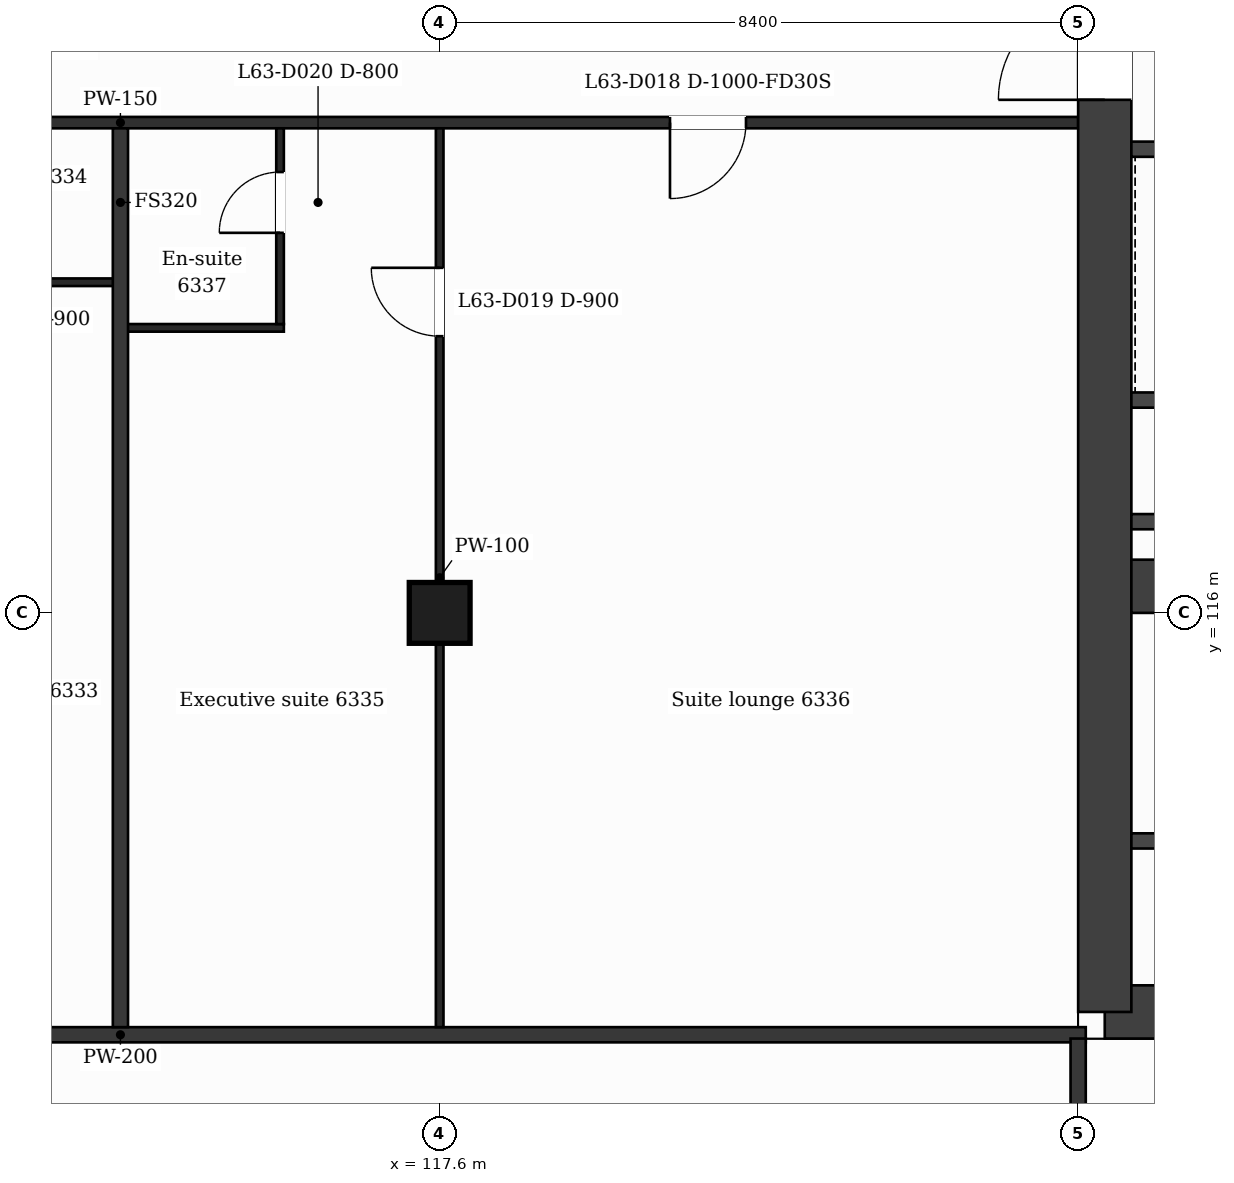
"""IFC4 building model, lengths in metres.
Left out: names, types, materials, properties, quantities, classifications, styles, units other than length and angle.
Written with IfcOpenShell. Run it as: python <this file> out.ifc"""

import sys

from ifc_helpers import new_model, si_unit, direction, frame, frame_2d, origin, origin_2d, place, context, subcontext, project, spatial, rectangle, extrude, element, fill, save


model = new_model("IFC4")
c1 = context("Model", 3, precision=1e-05, world=origin(), true_north=direction((0.0, 1.0)))
c2 = subcontext(c1, "Body", "Model", "MODEL_VIEW")
j1 = project(units=[si_unit("LENGTHUNIT", "METRE"), si_unit("PLANEANGLEUNIT", "RADIAN")], contexts=[c1])
p1 = place(None, origin())
s1 = spatial("IfcSite", under=j1, at=p1, CompositionType="ELEMENT")
p2 = place(p1, origin())
s2 = spatial("IfcBuilding", under=s1, at=p2, CompositionType="ELEMENT")
p3 = place(p2, frame((0.0, 0.0, 262.7)))
s3 = spatial("IfcBuildingStorey", under=s2, at=p3, CompositionType="ELEMENT", Elevation=262.7)
p4 = place(p3, frame((140.73, 110.75, 0.0), z_axis=(0.0, 0.0, 1.0), x_axis=(-1.0, 0.0, 0.0)))
e1 = element("IfcWall", 1, at=p4, inside=s3, PredefinedType="SHEAR", context=c2, shape_type="SweptSolid", body=[
    extrude(rectangle(XDim=14.38, YDim=0.7, at=frame_2d((7.19, 0.0))), origin(), (0.0, 0.0, 1.0), 3.7),
])
p5 = place(p4, frame((7.12, 0.0, 0.0)))
e2 = element("IfcOpeningElement", 2, at=p5, cuts=e1, PredefinedType="OPENING", context=c2, shape_type="SweptSolid", body=[
    extrude(rectangle(XDim=1.2, YDim=2.1, at=frame_2d((0.6, 1.05))), frame((0.0, 0.36, 0.0), z_axis=(0.0, -1.0, 0.0), x_axis=(1.0, 0.0, 0.0)), (0.0, 0.0, 1.0), 0.72),
])
p6 = place(p3, frame((126.35, 110.75, 0.0), z_axis=(0.0, 0.0, 1.0), x_axis=(0.0, 1.0, 0.0)))
e3 = element("IfcWall", 3, at=p6, inside=s3, PredefinedType="SHEAR", context=c2, shape_type="SweptSolid", body=[
    extrude(rectangle(XDim=21.3, YDim=0.7, at=frame_2d((10.65, 0.0))), origin(), (0.0, 0.0, 1.0), 3.7),
])
p7 = place(p6, frame((12.0, 0.0, 0.0)))
e4 = element("IfcOpeningElement", 4, at=p7, cuts=e3, PredefinedType="OPENING", context=c2, shape_type="SweptSolid", body=[
    extrude(rectangle(XDim=1.4, YDim=2.1, at=frame_2d((0.7, 1.05))), frame((0.0, 0.36, 0.0), z_axis=(0.0, -1.0, 0.0), x_axis=(1.0, 0.0, 0.0)), (0.0, 0.0, 1.0), 0.72),
])
p8 = place(p3, frame((126.7, 116.35, 0.0), z_axis=(0.0, 0.0, 1.0), x_axis=(1.0, 0.0, 0.0)))
e5 = element("IfcWall", 5, at=p8, inside=s3, PredefinedType="SHEAR", context=c2, shape_type="SweptSolid", body=[
    extrude(rectangle(XDim=5.5, YDim=0.7, at=frame_2d((2.75, 0.0))), origin(), (0.0, 0.0, 1.0), 3.7),
])
p9 = place(p3, frame((117.6, 116.0, 0.0), z_axis=(0.0, 0.0, 1.0), x_axis=(1.0, 0.0, 0.0)))
e6 = element("IfcColumn", 6, at=p9, inside=s3, PredefinedType="COLUMN", context=c2, shape_type="SweptSolid", body=[
    extrude(rectangle(XDim=0.8, YDim=0.8, at=origin_2d()), origin(), (0.0, 0.0, 1.0), 3.7),
])
p10 = place(p3, frame((100.7, 110.45, 0.0), z_axis=(0.0, 0.0, 1.0), x_axis=(1.0, 0.0, 0.0)))
e7 = element("IfcWall", 7, at=p10, inside=s3, PredefinedType="PARTITIONING", context=c2, shape_type="SweptSolid", body=[
    extrude(rectangle(XDim=25.4, YDim=0.2, at=frame_2d((12.7, 0.0))), origin(), (0.0, 0.0, 1.0), 3.38),
])
p11 = place(p3, frame((126.7, 113.0, 0.0), z_axis=(0.0, 0.0, 1.0), x_axis=(1.0, 0.0, 0.0)))
e8 = element("IfcWall", 8, at=p11, inside=s3, PredefinedType="PARTITIONING", context=c2, shape_type="SweptSolid", body=[
    extrude(rectangle(XDim=4.973, YDim=0.2, at=frame_2d((2.487, 0.0))), origin(), (0.0, 0.0, 1.0), 3.38),
])
p12 = place(p11, frame((2.805, 0.0, 0.0)))
e9 = element("IfcOpeningElement", 9, at=p12, cuts=e8, PredefinedType="OPENING", context=c2, shape_type="SweptSolid", body=[
    extrude(rectangle(XDim=0.9, YDim=2.1, at=frame_2d((0.45, 1.05))), frame((0.0, 0.11, 0.0), z_axis=(0.0, -1.0, 0.0), x_axis=(1.0, 0.0, 0.0)), (0.0, 0.0, 1.0), 0.22),
])
for number, where, z_axis, x_axis in (
    (10, (126.7, 117.2, 0.0), (0.0, 0.0, 1.0), (1.0, 0.0, 0.0)),
    (11, (126.7, 118.8, 0.0), (0.0, 0.0, 1.0), (1.0, 0.0, 0.0)),
):
    element("IfcWall", number, at=place(p3, frame(where, z_axis=z_axis, x_axis=x_axis)), inside=s3, PredefinedType="PARTITIONING", context=c2, shape_type="SweptSolid", body=[
        extrude(rectangle(XDim=4.873, YDim=0.2, at=frame_2d((2.437, 0.0))), origin(), (0.0, 0.0, 1.0), 3.38),
    ])
p13 = place(p3, frame((113.4, 119.75, 0.0), z_axis=(0.0, 0.0, 1.0), x_axis=(1.0, 0.0, 0.0)))
e12 = element("IfcWall", 12, at=p13, inside=s3, PredefinedType="PARTITIONING", context=c2, shape_type="SweptSolid", body=[
    extrude(rectangle(XDim=2.15, YDim=0.1, at=frame_2d((1.075, 0.0))), origin(), (0.0, 0.0, 1.0), 3.38),
])
p14 = place(p3, frame((110.65, 120.35, 0.0), z_axis=(0.0, 0.0, 1.0), x_axis=(1.0, 0.0, 0.0)))
e13 = element("IfcWall", 13, at=p14, inside=s3, PredefinedType="PARTITIONING", context=c2, shape_type="SweptSolid", body=[
    extrude(rectangle(XDim=2.75, YDim=0.1, at=frame_2d((1.375, 0.0))), origin(), (0.0, 0.0, 1.0), 3.38),
])
p15 = place(p14, frame((0.84, 0.0, 0.0)))
e14 = element("IfcOpeningElement", 14, at=p15, cuts=e13, PredefinedType="OPENING", context=c2, shape_type="SweptSolid", body=[
    extrude(rectangle(XDim=0.9, YDim=2.1, at=frame_2d((0.45, 1.05))), frame((0.0, 0.06, 0.0), z_axis=(0.0, -1.0, 0.0), x_axis=(1.0, 0.0, 0.0)), (0.0, 0.0, 1.0), 0.12),
])
p16 = place(p3, frame((126.7, 122.1, 0.0), z_axis=(0.0, 0.0, 1.0), x_axis=(1.0, 0.0, 0.0)))
e15 = element("IfcWall", 15, at=p16, inside=s3, PredefinedType="PARTITIONING", context=c2, shape_type="SweptSolid", body=[
    extrude(rectangle(XDim=4.873, YDim=0.2, at=frame_2d((2.437, 0.0))), origin(), (0.0, 0.0, 1.0), 3.38),
])
p17 = place(p16, frame((3.105, 0.0, 0.0)))
e16 = element("IfcOpeningElement", 16, at=p17, cuts=e15, PredefinedType="OPENING", context=c2, shape_type="SweptSolid", body=[
    extrude(rectangle(XDim=1.1, YDim=2.1, at=frame_2d((0.55, 1.05))), frame((0.0, 0.11, 0.0), z_axis=(0.0, -1.0, 0.0), x_axis=(1.0, 0.0, 0.0)), (0.0, 0.0, 1.0), 0.22),
])
p18 = place(p16, frame((0.509, 0.0, 0.0)))
e17 = element("IfcOpeningElement", 17, at=p18, cuts=e15, PredefinedType="OPENING", context=c2, shape_type="SweptSolid", body=[
    extrude(rectangle(XDim=1.1, YDim=2.1, at=frame_2d((0.55, 1.05))), frame((0.0, 0.11, 0.0), z_axis=(0.0, -1.0, 0.0), x_axis=(1.0, 0.0, 0.0)), (0.0, 0.0, 1.0), 0.22),
])
p19 = place(p3, frame((100.8, 122.45, 0.0), z_axis=(0.0, 0.0, 1.0), x_axis=(1.0, 0.0, 0.0)))
e18 = element("IfcWall", 18, at=p19, inside=s3, PredefinedType="PARTITIONING", context=c2, shape_type="SweptSolid", body=[
    extrude(rectangle(XDim=25.2, YDim=0.15, at=frame_2d((12.6, 0.0))), origin(), (0.0, 0.0, 1.0), 3.38),
])
p20 = place(p19, frame((5.55, 0.0, 0.0)))
e19 = element("IfcOpeningElement", 19, at=p20, cuts=e18, PredefinedType="OPENING", context=c2, shape_type="SweptSolid", body=[
    extrude(rectangle(XDim=1.0, YDim=2.1, at=frame_2d((0.5, 1.05))), frame((0.0, 0.085, 0.0), z_axis=(0.0, -1.0, 0.0), x_axis=(1.0, 0.0, 0.0)), (0.0, 0.0, 1.0), 0.17),
])
p21 = place(p19, frame((8.65, 0.0, 0.0)))
e20 = element("IfcOpeningElement", 20, at=p21, cuts=e18, PredefinedType="OPENING", context=c2, shape_type="SweptSolid", body=[
    extrude(rectangle(XDim=1.0, YDim=2.1, at=frame_2d((0.5, 1.05))), frame((0.0, 0.085, 0.0), z_axis=(0.0, -1.0, 0.0), x_axis=(1.0, 0.0, 0.0)), (0.0, 0.0, 1.0), 0.17),
])
p22 = place(p19, frame((19.83, 0.0, 0.0)))
e21 = element("IfcOpeningElement", 21, at=p22, cuts=e18, PredefinedType="OPENING", context=c2, shape_type="SweptSolid", body=[
    extrude(rectangle(XDim=1.0, YDim=2.1, at=frame_2d((0.5, 1.05))), frame((0.0, 0.085, 0.0), z_axis=(0.0, -1.0, 0.0), x_axis=(1.0, 0.0, 0.0)), (0.0, 0.0, 1.0), 0.17),
])
p23 = place(p3, frame((113.4, 110.55, 0.0), z_axis=(0.0, 0.0, 1.0), x_axis=(0.0, 1.0, 0.0)))
e22 = element("IfcWall", 22, at=p23, inside=s3, PredefinedType="PARTITIONING", context=c2, shape_type="SweptSolid", body=[
    extrude(rectangle(XDim=11.825, YDim=0.2, at=frame_2d((5.913, 0.0))), origin(), (0.0, 0.0, 1.0), 3.38),
])
p24 = place(p3, frame((115.5, 119.8, 0.0), z_axis=(0.0, 0.0, 1.0), x_axis=(0.0, 1.0, 0.0)))
e23 = element("IfcWall", 23, at=p24, inside=s3, PredefinedType="PARTITIONING", context=c2, shape_type="SweptSolid", body=[
    extrude(rectangle(XDim=2.575, YDim=0.1, at=frame_2d((1.288, 0.0))), origin(), (0.0, 0.0, 1.0), 3.38),
])
p25 = place(p24, frame((1.2, 0.0, 0.0)))
e24 = element("IfcOpeningElement", 24, at=p25, cuts=e23, PredefinedType="OPENING", context=c2, shape_type="SweptSolid", body=[
    extrude(rectangle(XDim=0.8, YDim=2.1, at=frame_2d((0.4, 1.05))), frame((0.0, 0.06, 0.0), z_axis=(0.0, -1.0, 0.0), x_axis=(1.0, 0.0, 0.0)), (0.0, 0.0, 1.0), 0.12),
])
p26 = place(p3, frame((117.6, 110.55, 0.0), z_axis=(0.0, 0.0, 1.0), x_axis=(0.0, 1.0, 0.0)))
e25 = element("IfcWall", 25, at=p26, inside=s3, PredefinedType="PARTITIONING", context=c2, shape_type="SweptSolid", body=[
    extrude(rectangle(XDim=11.825, YDim=0.1, at=frame_2d((5.913, 0.0))), origin(), (0.0, 0.0, 1.0), 3.38),
])
p27 = place(p26, frame((9.09, 0.0, 0.0)))
e26 = element("IfcOpeningElement", 26, at=p27, cuts=e25, PredefinedType="OPENING", context=c2, shape_type="SweptSolid", body=[
    extrude(rectangle(XDim=0.9, YDim=2.1, at=frame_2d((0.45, 1.05))), frame((0.0, 0.06, 0.0), z_axis=(0.0, -1.0, 0.0), x_axis=(1.0, 0.0, 0.0)), (0.0, 0.0, 1.0), 0.12),
])
p28 = place(p3, frame((126.0, 108.79, 0.0), z_axis=(0.0, 0.0, 1.0), x_axis=(0.0, 1.0, 0.0)))
e27 = element("IfcWall", 27, at=p28, inside=s3, PredefinedType="PARTITIONING", context=c2, shape_type="SweptSolid", body=[
    extrude(rectangle(XDim=1.61, YDim=0.2, at=frame_2d((0.805, 0.0))), origin(), (0.0, 0.0, 1.0), 3.38),
])
p29 = place(p22, origin())
e28 = element("IfcDoor", 28, at=p29, inside=s3, OperationType="SINGLE_SWING_LEFT", PredefinedType="DOOR", context=c2, shape_type="SweptSolid", body=[
    extrude(rectangle(XDim=1.0, YDim=2.1, at=frame_2d((0.5, 1.05))), frame((0.0, 0.025, 0.0), z_axis=(0.0, -1.0, 0.0), x_axis=(1.0, 0.0, 0.0)), (0.0, 0.0, 1.0), 0.05),
])
fill(e21, e28)
p30 = place(p27, origin())
e29 = element("IfcDoor", 29, at=p30, inside=s3, OperationType="SINGLE_SWING_RIGHT", PredefinedType="DOOR", context=c2, shape_type="SweptSolid", body=[
    extrude(rectangle(XDim=0.9, YDim=2.1, at=frame_2d((0.45, 1.05))), frame((0.0, 0.025, 0.0), z_axis=(0.0, -1.0, 0.0), x_axis=(1.0, 0.0, 0.0)), (0.0, 0.0, 1.0), 0.05),
])
fill(e26, e29)
p31 = place(p25, origin())
e30 = element("IfcDoor", 30, at=p31, inside=s3, OperationType="SINGLE_SWING_LEFT", PredefinedType="DOOR", context=c2, shape_type="SweptSolid", body=[
    extrude(rectangle(XDim=0.8, YDim=2.1, at=frame_2d((0.4, 1.05))), frame((0.0, 0.025, 0.0), z_axis=(0.0, -1.0, 0.0), x_axis=(1.0, 0.0, 0.0)), (0.0, 0.0, 1.0), 0.05),
])
fill(e24, e30)
p32 = place(p7, origin())
e31 = element("IfcDoor", 31, at=p32, inside=s3, OperationType="SINGLE_SWING_LEFT", PredefinedType="DOOR", context=c2, shape_type="SweptSolid", body=[
    extrude(rectangle(XDim=1.4, YDim=2.1, at=frame_2d((0.7, 1.05))), frame((0.0, 0.025, 0.0), z_axis=(0.0, -1.0, 0.0), x_axis=(1.0, 0.0, 0.0)), (0.0, 0.0, 1.0), 0.05),
])
fill(e4, e31)
save(model, sys.argv[1])
